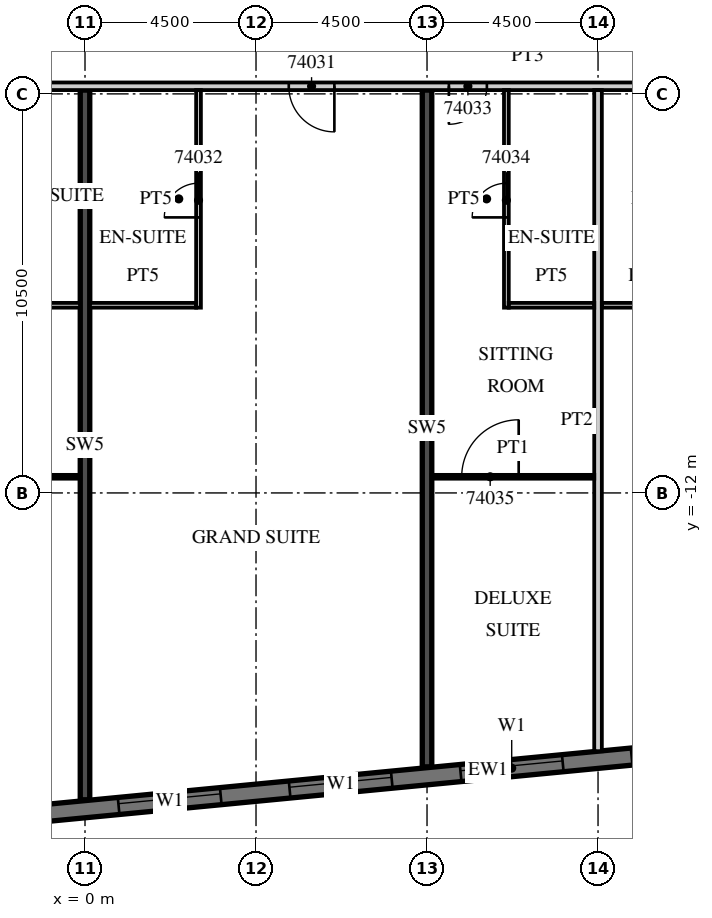
"""IFC4 building model, lengths in metres.
Left out: names, types, materials, properties, quantities, classifications, styles, units other than length and angle.
Written with IfcOpenShell. Run it as: python <this file> out.ifc"""

import sys

from ifc_helpers import new_model, si_unit, direction, frame, frame_2d, origin, place, context, subcontext, project, spatial, rectangle, extrude, element, fill, save


model = new_model("IFC4")
c1 = context("Model", 3, precision=1e-05, world=origin(), true_north=direction((0.0, 1.0)))
c2 = subcontext(c1, "Body", "Model", "MODEL_VIEW")
j1 = project(units=[si_unit("LENGTHUNIT", "METRE"), si_unit("PLANEANGLEUNIT", "RADIAN")], contexts=[c1])
p1 = place(None, origin())
s1 = spatial("IfcSite", under=j1, at=p1, CompositionType="ELEMENT")
p2 = place(p1, origin())
s2 = spatial("IfcBuilding", under=s1, at=p2, CompositionType="ELEMENT")
p3 = place(p2, frame((0.0, 0.0, 294.9)))
s3 = spatial("IfcBuildingStorey", under=s2, at=p3, CompositionType="ELEMENT", Elevation=294.9)
p4 = place(p3, frame((0.0, -20.074, 0.0), z_axis=(0.0, 0.0, 1.0), x_axis=(0.0, 1.0, 0.0)))
e1 = element("IfcWall", 1, at=p4, inside=s3, PredefinedType="SHEAR", context=c2, shape_type="SweptSolid", body=[
    extrude(rectangle(XDim=18.674, YDim=0.25, at=frame_2d((9.337, 0.0))), origin(), (0.0, 0.0, 1.0), 3.3),
])
p5 = place(p3, frame((9.0, -19.207, 0.0), z_axis=(0.0, 0.0, 1.0), x_axis=(0.0, 1.0, 0.0)))
e2 = element("IfcWall", 2, at=p5, inside=s3, PredefinedType="SHEAR", context=c2, shape_type="SweptSolid", body=[
    extrude(rectangle(XDim=17.807, YDim=0.25, at=frame_2d((8.904, 0.0))), origin(), (0.0, 0.0, 1.0), 3.3),
])
p6 = place(p3, frame((-13.521, -21.624, 0.0), z_axis=(0.0, 0.0, 1.0), x_axis=(0.995396186218, 0.095845878695, 0.0)))
e3 = element("IfcWall", 3, at=p6, inside=s3, PredefinedType="SOLIDWALL", context=c2, shape_type="SweptSolid", body=[
    extrude(rectangle(XDim=48.481, YDim=0.45, at=frame_2d((24.241, 0.0))), origin(), (0.0, 0.0, 1.0), 3.02),
])
p7 = place(p6, frame((0.91, 0.0, 0.45)))
e4 = element("IfcOpeningElement", 4, at=p7, cuts=e3, PredefinedType="OPENING", context=c2, shape_type="SweptSolid", body=[
    extrude(rectangle(XDim=2.7, YDim=2.25, at=frame_2d((1.35, 1.125))), frame((0.0, 0.235, 0.0), z_axis=(0.0, -1.0, 0.0), x_axis=(1.0, 0.0, 0.0)), (0.0, 0.0, 1.0), 0.47),
])
p8 = place(p6, frame((5.431, 0.0, 0.45)))
e5 = element("IfcOpeningElement", 5, at=p8, cuts=e3, PredefinedType="OPENING", context=c2, shape_type="SweptSolid", body=[
    extrude(rectangle(XDim=2.7, YDim=2.25, at=frame_2d((1.35, 1.125))), frame((0.0, 0.235, 0.0), z_axis=(0.0, -1.0, 0.0), x_axis=(1.0, 0.0, 0.0)), (0.0, 0.0, 1.0), 0.47),
])
p9 = place(p6, frame((9.952, 0.0, 0.45)))
e6 = element("IfcOpeningElement", 6, at=p9, cuts=e3, PredefinedType="OPENING", context=c2, shape_type="SweptSolid", body=[
    extrude(rectangle(XDim=2.7, YDim=2.25, at=frame_2d((1.35, 1.125))), frame((0.0, 0.235, 0.0), z_axis=(0.0, -1.0, 0.0), x_axis=(1.0, 0.0, 0.0)), (0.0, 0.0, 1.0), 0.47),
])
p10 = place(p6, frame((14.473, 0.0, 0.45)))
e7 = element("IfcOpeningElement", 7, at=p10, cuts=e3, PredefinedType="OPENING", context=c2, shape_type="SweptSolid", body=[
    extrude(rectangle(XDim=2.7, YDim=2.25, at=frame_2d((1.35, 1.125))), frame((0.0, 0.235, 0.0), z_axis=(0.0, -1.0, 0.0), x_axis=(1.0, 0.0, 0.0)), (0.0, 0.0, 1.0), 0.47),
])
p11 = place(p6, frame((18.994, 0.0, 0.45)))
e8 = element("IfcOpeningElement", 8, at=p11, cuts=e3, PredefinedType="OPENING", context=c2, shape_type="SweptSolid", body=[
    extrude(rectangle(XDim=2.7, YDim=2.25, at=frame_2d((1.35, 1.125))), frame((0.0, 0.235, 0.0), z_axis=(0.0, -1.0, 0.0), x_axis=(1.0, 0.0, 0.0)), (0.0, 0.0, 1.0), 0.47),
])
p12 = place(p6, frame((23.514, 0.0, 0.45)))
e9 = element("IfcOpeningElement", 9, at=p12, cuts=e3, PredefinedType="OPENING", context=c2, shape_type="SweptSolid", body=[
    extrude(rectangle(XDim=2.7, YDim=2.25, at=frame_2d((1.35, 1.125))), frame((0.0, 0.235, 0.0), z_axis=(0.0, -1.0, 0.0), x_axis=(1.0, 0.0, 0.0)), (0.0, 0.0, 1.0), 0.47),
])
p13 = place(p6, frame((28.035, 0.0, 0.45)))
e10 = element("IfcOpeningElement", 10, at=p13, cuts=e3, PredefinedType="OPENING", context=c2, shape_type="SweptSolid", body=[
    extrude(rectangle(XDim=2.7, YDim=2.25, at=frame_2d((1.35, 1.125))), frame((0.0, 0.235, 0.0), z_axis=(0.0, -1.0, 0.0), x_axis=(1.0, 0.0, 0.0)), (0.0, 0.0, 1.0), 0.47),
])
p14 = place(p6, frame((32.556, 0.0, 0.45)))
e11 = element("IfcOpeningElement", 11, at=p14, cuts=e3, PredefinedType="OPENING", context=c2, shape_type="SweptSolid", body=[
    extrude(rectangle(XDim=2.7, YDim=2.25, at=frame_2d((1.35, 1.125))), frame((0.0, 0.235, 0.0), z_axis=(0.0, -1.0, 0.0), x_axis=(1.0, 0.0, 0.0)), (0.0, 0.0, 1.0), 0.47),
])
p15 = place(p6, frame((37.077, 0.0, 0.45)))
e12 = element("IfcOpeningElement", 12, at=p15, cuts=e3, PredefinedType="OPENING", context=c2, shape_type="SweptSolid", body=[
    extrude(rectangle(XDim=2.7, YDim=2.25, at=frame_2d((1.35, 1.125))), frame((0.0, 0.235, 0.0), z_axis=(0.0, -1.0, 0.0), x_axis=(1.0, 0.0, 0.0)), (0.0, 0.0, 1.0), 0.47),
])
p16 = place(p6, frame((41.598, 0.0, 0.45)))
e13 = element("IfcOpeningElement", 13, at=p16, cuts=e3, PredefinedType="OPENING", context=c2, shape_type="SweptSolid", body=[
    extrude(rectangle(XDim=2.7, YDim=2.25, at=frame_2d((1.35, 1.125))), frame((0.0, 0.235, 0.0), z_axis=(0.0, -1.0, 0.0), x_axis=(1.0, 0.0, 0.0)), (0.0, 0.0, 1.0), 0.47),
])
p17 = place(p3, frame((-13.5, -1.3, 0.0), z_axis=(0.0, 0.0, 1.0), x_axis=(1.0, 0.0, 0.0)))
e14 = element("IfcWall", 14, at=p17, inside=s3, PredefinedType="PARTITIONING", context=c2, shape_type="SweptSolid", body=[
    extrude(rectangle(XDim=50.293, YDim=0.2, at=frame_2d((25.146, 0.0))), origin(), (0.0, 0.0, 1.0), 3.02),
])
p18 = place(p17, frame((2.925, 0.0, 0.0)))
e15 = element("IfcOpeningElement", 15, at=p18, cuts=e14, PredefinedType="OPENING", context=c2, shape_type="SweptSolid", body=[
    extrude(rectangle(XDim=1.0, YDim=2.1, at=frame_2d((0.5, 1.05))), frame((0.0, 0.11, 0.0), z_axis=(0.0, -1.0, 0.0), x_axis=(1.0, 0.0, 0.0)), (0.0, 0.0, 1.0), 0.22),
])
p19 = place(p17, frame((7.45, 0.0, 0.0)))
e16 = element("IfcOpeningElement", 16, at=p19, cuts=e14, PredefinedType="OPENING", context=c2, shape_type="SweptSolid", body=[
    extrude(rectangle(XDim=1.0, YDim=2.1, at=frame_2d((0.5, 1.05))), frame((0.0, 0.11, 0.0), z_axis=(0.0, -1.0, 0.0), x_axis=(1.0, 0.0, 0.0)), (0.0, 0.0, 1.0), 0.22),
])
p20 = place(p17, frame((9.55, 0.0, 0.0)))
e17 = element("IfcOpeningElement", 17, at=p20, cuts=e14, PredefinedType="OPENING", context=c2, shape_type="SweptSolid", body=[
    extrude(rectangle(XDim=1.0, YDim=2.1, at=frame_2d((0.5, 1.05))), frame((0.0, 0.11, 0.0), z_axis=(0.0, -1.0, 0.0), x_axis=(1.0, 0.0, 0.0)), (0.0, 0.0, 1.0), 0.22),
])
p21 = place(p17, frame((18.862, 0.0, 0.0)))
e18 = element("IfcOpeningElement", 18, at=p21, cuts=e14, PredefinedType="OPENING", context=c2, shape_type="SweptSolid", body=[
    extrude(rectangle(XDim=1.2, YDim=2.1, at=frame_2d((0.6, 1.05))), frame((0.0, 0.11, 0.0), z_axis=(0.0, -1.0, 0.0), x_axis=(1.0, 0.0, 0.0)), (0.0, 0.0, 1.0), 0.22),
])
p22 = place(p17, frame((23.075, 0.0, 0.0)))
e19 = element("IfcOpeningElement", 19, at=p22, cuts=e14, PredefinedType="OPENING", context=c2, shape_type="SweptSolid", body=[
    extrude(rectangle(XDim=1.0, YDim=2.1, at=frame_2d((0.5, 1.05))), frame((0.0, 0.11, 0.0), z_axis=(0.0, -1.0, 0.0), x_axis=(1.0, 0.0, 0.0)), (0.0, 0.0, 1.0), 0.22),
])
p23 = place(p17, frame((29.925, 0.0, 0.0)))
e20 = element("IfcOpeningElement", 20, at=p23, cuts=e14, PredefinedType="OPENING", context=c2, shape_type="SweptSolid", body=[
    extrude(rectangle(XDim=1.0, YDim=2.1, at=frame_2d((0.5, 1.05))), frame((0.0, 0.11, 0.0), z_axis=(0.0, -1.0, 0.0), x_axis=(1.0, 0.0, 0.0)), (0.0, 0.0, 1.0), 0.22),
])
p24 = place(p17, frame((33.938, 0.0, 0.0)))
e21 = element("IfcOpeningElement", 21, at=p24, cuts=e14, PredefinedType="OPENING", context=c2, shape_type="SweptSolid", body=[
    extrude(rectangle(XDim=1.2, YDim=2.1, at=frame_2d((0.6, 1.05))), frame((0.0, 0.11, 0.0), z_axis=(0.0, -1.0, 0.0), x_axis=(1.0, 0.0, 0.0)), (0.0, 0.0, 1.0), 0.22),
])
p25 = place(p17, frame((43.45, 0.0, 0.0)))
e22 = element("IfcOpeningElement", 22, at=p25, cuts=e14, PredefinedType="OPENING", context=c2, shape_type="SweptSolid", body=[
    extrude(rectangle(XDim=1.0, YDim=2.1, at=frame_2d((0.5, 1.05))), frame((0.0, 0.11, 0.0), z_axis=(0.0, -1.0, 0.0), x_axis=(1.0, 0.0, 0.0)), (0.0, 0.0, 1.0), 0.22),
])
p26 = place(p17, frame((45.55, 0.0, 0.0)))
e23 = element("IfcOpeningElement", 23, at=p26, cuts=e14, PredefinedType="OPENING", context=c2, shape_type="SweptSolid", body=[
    extrude(rectangle(XDim=1.0, YDim=2.1, at=frame_2d((0.5, 1.05))), frame((0.0, 0.11, 0.0), z_axis=(0.0, -1.0, 0.0), x_axis=(1.0, 0.0, 0.0)), (0.0, 0.0, 1.0), 0.22),
])
p27 = place(p3, frame((-2.375, -7.062, 0.0), z_axis=(0.0, 0.0, 1.0), x_axis=(1.0, 0.0, 0.0)))
e24 = element("IfcWall", 24, at=p27, inside=s3, PredefinedType="PARTITIONING", context=c2, shape_type="SweptSolid", body=[
    extrude(rectangle(XDim=2.25, YDim=0.125, at=frame_2d((1.125, 0.0))), origin(), (0.0, 0.0, 1.0), 3.02),
])
p28 = place(p3, frame((-4.4, -11.575, 0.0), z_axis=(0.0, 0.0, 1.0), x_axis=(1.0, 0.0, 0.0)))
e25 = element("IfcWall", 25, at=p28, inside=s3, PredefinedType="PARTITIONING", context=c2, shape_type="SweptSolid", body=[
    extrude(rectangle(XDim=4.275, YDim=0.1, at=frame_2d((2.137, 0.0))), origin(), (0.0, 0.0, 1.0), 3.02),
])
p29 = place(p28, frame((1.388, 0.0, 0.0)))
e26 = element("IfcOpeningElement", 26, at=p29, cuts=e25, PredefinedType="OPENING", context=c2, shape_type="SweptSolid", body=[
    extrude(rectangle(XDim=1.5, YDim=2.1, at=frame_2d((0.75, 1.05))), frame((0.0, 0.06, 0.0), z_axis=(0.0, -1.0, 0.0), x_axis=(1.0, 0.0, 0.0)), (0.0, 0.0, 1.0), 0.12),
])
p30 = place(p3, frame((2.987, -7.125, 0.0), z_axis=(0.0, 0.0, 1.0), x_axis=(0.0, 1.0, 0.0)))
e27 = element("IfcWall", 27, at=p30, inside=s3, PredefinedType="PARTITIONING", context=c2, shape_type="SweptSolid", body=[
    extrude(rectangle(XDim=5.725, YDim=0.125, at=frame_2d((2.863, 0.0))), origin(), (0.0, 0.0, 1.0), 3.02),
])
p31 = place(p30, frame((2.375, 0.0, 0.0)))
e28 = element("IfcOpeningElement", 28, at=p31, cuts=e27, PredefinedType="OPENING", context=c2, shape_type="SweptSolid", body=[
    extrude(rectangle(XDim=0.9, YDim=2.1, at=frame_2d((0.45, 1.05))), frame((0.0, 0.073, 0.0), z_axis=(0.0, -1.0, 0.0), x_axis=(1.0, 0.0, 0.0)), (0.0, 0.0, 1.0), 0.145),
])
p32 = place(p3, frame((0.125, -7.062, 0.0), z_axis=(0.0, 0.0, 1.0), x_axis=(1.0, 0.0, 0.0)))
e29 = element("IfcWall", 29, at=p32, inside=s3, PredefinedType="PARTITIONING", context=c2, shape_type="SweptSolid", body=[
    extrude(rectangle(XDim=2.8, YDim=0.125, at=frame_2d((1.4, 0.0))), origin(), (0.0, 0.0, 1.0), 3.02),
])
p33 = place(p3, frame((13.5, -18.796, 0.0), z_axis=(0.0, 0.0, 1.0), x_axis=(0.0, 1.0, 0.0)))
e30 = element("IfcWall", 30, at=p33, inside=s3, PredefinedType="PARTITIONING", context=c2, shape_type="SweptSolid", body=[
    extrude(rectangle(XDim=17.396, YDim=0.2, at=frame_2d((8.698, 0.0))), origin(), (0.0, 0.0, 1.0), 3.02),
])
p34 = place(p3, frame((11.088, -7.125, 0.0), z_axis=(0.0, 0.0, 1.0), x_axis=(0.0, 1.0, 0.0)))
e31 = element("IfcWall", 31, at=p34, inside=s3, PredefinedType="PARTITIONING", context=c2, shape_type="SweptSolid", body=[
    extrude(rectangle(XDim=5.725, YDim=0.125, at=frame_2d((2.863, 0.0))), origin(), (0.0, 0.0, 1.0), 3.02),
])
p35 = place(p34, frame((2.375, 0.0, 0.0)))
e32 = element("IfcOpeningElement", 32, at=p35, cuts=e31, PredefinedType="OPENING", context=c2, shape_type="SweptSolid", body=[
    extrude(rectangle(XDim=0.9, YDim=2.1, at=frame_2d((0.45, 1.05))), frame((0.0, 0.073, 0.0), z_axis=(0.0, -1.0, 0.0), x_axis=(1.0, 0.0, 0.0)), (0.0, 0.0, 1.0), 0.145),
])
p36 = place(p3, frame((11.15, -7.062, 0.0), z_axis=(0.0, 0.0, 1.0), x_axis=(1.0, 0.0, 0.0)))
e33 = element("IfcWall", 33, at=p36, inside=s3, PredefinedType="PARTITIONING", context=c2, shape_type="SweptSolid", body=[
    extrude(rectangle(XDim=2.25, YDim=0.125, at=frame_2d((1.125, 0.0))), origin(), (0.0, 0.0, 1.0), 3.02),
])
p37 = place(p3, frame((9.125, -11.575, 0.0), z_axis=(0.0, 0.0, 1.0), x_axis=(1.0, 0.0, 0.0)))
e34 = element("IfcWall", 34, at=p37, inside=s3, PredefinedType="PARTITIONING", context=c2, shape_type="SweptSolid", body=[
    extrude(rectangle(XDim=4.275, YDim=0.1, at=frame_2d((2.137, 0.0))), origin(), (0.0, 0.0, 1.0), 3.02),
])
p38 = place(p37, frame((0.787, 0.0, 0.0)))
e35 = element("IfcOpeningElement", 35, at=p38, cuts=e34, PredefinedType="OPENING", context=c2, shape_type="SweptSolid", body=[
    extrude(rectangle(XDim=1.5, YDim=2.1, at=frame_2d((0.75, 1.05))), frame((0.0, 0.06, 0.0), z_axis=(0.0, -1.0, 0.0), x_axis=(1.0, 0.0, 0.0)), (0.0, 0.0, 1.0), 0.12),
])
p39 = place(p3, frame((13.6, -7.062, 0.0), z_axis=(0.0, 0.0, 1.0), x_axis=(1.0, 0.0, 0.0)))
e36 = element("IfcWall", 36, at=p39, inside=s3, PredefinedType="PARTITIONING", context=c2, shape_type="SweptSolid", body=[
    extrude(rectangle(XDim=2.25, YDim=0.125, at=frame_2d((1.125, 0.0))), origin(), (0.0, 0.0, 1.0), 3.02),
])
p40 = place(p10, origin())
e37 = element("IfcWindow", 37, at=p40, inside=s3, PartitioningType="SINGLE_PANEL", PredefinedType="WINDOW", context=c2, shape_type="SweptSolid", body=[
    extrude(rectangle(XDim=2.7, YDim=2.25, at=frame_2d((1.35, 1.125))), frame((0.0, 0.09, 0.0), z_axis=(0.0, -1.0, 0.0), x_axis=(1.0, 0.0, 0.0)), (0.0, 0.0, 1.0), 0.06),
])
fill(e7, e37)
p41 = place(p11, origin())
e38 = element("IfcWindow", 38, at=p41, inside=s3, PartitioningType="SINGLE_PANEL", PredefinedType="WINDOW", context=c2, shape_type="SweptSolid", body=[
    extrude(rectangle(XDim=2.7, YDim=2.25, at=frame_2d((1.35, 1.125))), frame((0.0, 0.09, 0.0), z_axis=(0.0, -1.0, 0.0), x_axis=(1.0, 0.0, 0.0)), (0.0, 0.0, 1.0), 0.06),
])
fill(e8, e38)
p42 = place(p12, origin())
e39 = element("IfcWindow", 39, at=p42, inside=s3, PartitioningType="SINGLE_PANEL", PredefinedType="WINDOW", context=c2, shape_type="SweptSolid", body=[
    extrude(rectangle(XDim=2.7, YDim=2.25, at=frame_2d((1.35, 1.125))), frame((0.0, 0.09, 0.0), z_axis=(0.0, -1.0, 0.0), x_axis=(1.0, 0.0, 0.0)), (0.0, 0.0, 1.0), 0.06),
])
fill(e9, e39)
p43 = place(p13, origin())
e40 = element("IfcWindow", 40, at=p43, inside=s3, PartitioningType="SINGLE_PANEL", PredefinedType="WINDOW", context=c2, shape_type="SweptSolid", body=[
    extrude(rectangle(XDim=2.7, YDim=2.25, at=frame_2d((1.35, 1.125))), frame((0.0, 0.09, 0.0), z_axis=(0.0, -1.0, 0.0), x_axis=(1.0, 0.0, 0.0)), (0.0, 0.0, 1.0), 0.06),
])
fill(e10, e40)
p44 = place(p21, origin())
e41 = element("IfcDoor", 41, at=p44, inside=s3, OperationType="SINGLE_SWING_RIGHT", PredefinedType="DOOR", context=c2, shape_type="SweptSolid", body=[
    extrude(rectangle(XDim=1.2, YDim=2.1, at=frame_2d((0.6, 1.05))), frame((0.0, 0.025, 0.0), z_axis=(0.0, -1.0, 0.0), x_axis=(1.0, 0.0, 0.0)), (0.0, 0.0, 1.0), 0.05),
])
fill(e18, e41)
p45 = place(p31, origin())
e42 = element("IfcDoor", 42, at=p45, inside=s3, OperationType="SINGLE_SWING_LEFT", PredefinedType="DOOR", context=c2, shape_type="SweptSolid", body=[
    extrude(rectangle(XDim=0.9, YDim=2.1, at=frame_2d((0.45, 1.05))), frame((0.0, 0.025, 0.0), z_axis=(0.0, -1.0, 0.0), x_axis=(1.0, 0.0, 0.0)), (0.0, 0.0, 1.0), 0.05),
])
fill(e28, e42)
p46 = place(p22, origin())
e43 = element("IfcDoor", 43, at=p46, inside=s3, OperationType="SINGLE_SWING_LEFT", PredefinedType="DOOR", context=c2, shape_type="SweptSolid", body=[
    extrude(rectangle(XDim=1.0, YDim=2.1, at=frame_2d((0.5, 1.05))), frame((0.0, 0.025, 0.0), z_axis=(0.0, -1.0, 0.0), x_axis=(1.0, 0.0, 0.0)), (0.0, 0.0, 1.0), 0.05),
])
fill(e19, e43)
p47 = place(p35, origin())
e44 = element("IfcDoor", 44, at=p47, inside=s3, OperationType="SINGLE_SWING_LEFT", PredefinedType="DOOR", context=c2, shape_type="SweptSolid", body=[
    extrude(rectangle(XDim=0.9, YDim=2.1, at=frame_2d((0.45, 1.05))), frame((0.0, 0.025, 0.0), z_axis=(0.0, -1.0, 0.0), x_axis=(1.0, 0.0, 0.0)), (0.0, 0.0, 1.0), 0.05),
])
fill(e32, e44)
p48 = place(p38, origin())
e45 = element("IfcDoor", 45, at=p48, inside=s3, OperationType="SINGLE_SWING_RIGHT", PredefinedType="DOOR", context=c2, shape_type="SweptSolid", body=[
    extrude(rectangle(XDim=1.5, YDim=2.1, at=frame_2d((0.75, 1.05))), frame((0.0, 0.025, 0.0), z_axis=(0.0, -1.0, 0.0), x_axis=(1.0, 0.0, 0.0)), (0.0, 0.0, 1.0), 0.05),
])
fill(e35, e45)
save(model, sys.argv[1])
